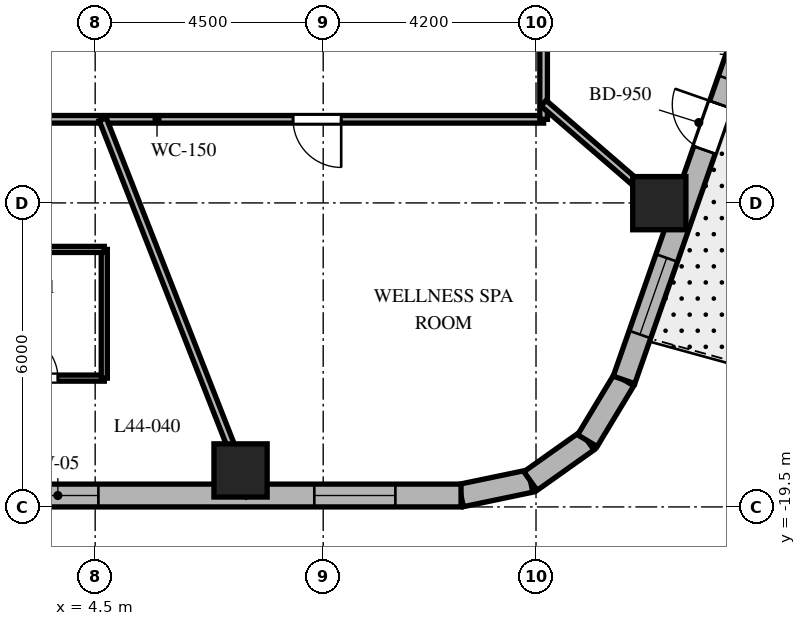
"""IFC4 building model, lengths in metres.
Left out: names, types, materials, properties, quantities, classifications, styles, units other than length and angle.
Written with IfcOpenShell. Run it as: python <this file> out.ifc"""

import sys

from ifc_helpers import new_model, si_unit, direction, frame, frame_2d, origin, origin_2d, place, context, subcontext, project, spatial, rectangle, extrude, element, fill, save


model = new_model("IFC4")
c1 = context("Model", 3, precision=1e-05, world=origin(), true_north=direction((0.0, 1.0)))
c2 = subcontext(c1, "Body", "Model", "MODEL_VIEW")
j1 = project(units=[si_unit("LENGTHUNIT", "METRE"), si_unit("PLANEANGLEUNIT", "RADIAN")], contexts=[c1])
p1 = place(None, origin())
s1 = spatial("IfcSite", under=j1, at=p1, CompositionType="ELEMENT")
p2 = place(p1, origin())
s2 = spatial("IfcBuilding", under=s1, at=p2, CompositionType="ELEMENT")
p3 = place(p2, frame((0.0, 0.0, 179.3)))
s3 = spatial("IfcBuildingStorey", under=s2, at=p3, CompositionType="ELEMENT", Elevation=179.3)
for number, where, z_axis, x_axis in (
    (1, (7.369, -18.78, 0.0), (0.0, 0.0, 1.0), (1.0, 0.0, 0.0)),
    (2, (15.633, -13.505, 0.0), (0.0, 0.0, 1.0), (1.0, 0.0, 0.0)),
):
    element("IfcColumn", number, at=place(p3, frame(where, z_axis=z_axis, x_axis=x_axis)), inside=s3, PredefinedType="COLUMN", context=c2, shape_type="SweptSolid", body=[
        extrude(rectangle(XDim=1.05, YDim=1.05, at=origin_2d()), origin(), (0.0, 0.0, 1.0), 3.7),
    ])
p4 = place(p3, frame((11.72, -19.275, 0.0), z_axis=(0.0, 0.0, 1.0), x_axis=(0.97893106758, 0.204191001093, 0.0)))
e3 = element("IfcWall", 3, at=p4, inside=s3, PredefinedType="SOLIDWALL", context=c2, shape_type="SweptSolid", body=[
    extrude(rectangle(XDim=1.4, YDim=0.45, at=frame_2d((0.7, 0.0))), origin(), (0.0, 0.0, 1.0), 3.4),
])
p5 = place(p3, frame((13.091, -18.989, 0.0), z_axis=(0.0, 0.0, 1.0), x_axis=(0.815574637848, 0.578651890258, 0.0)))
e4 = element("IfcWall", 4, at=p5, inside=s3, PredefinedType="SOLIDWALL", context=c2, shape_type="SweptSolid", body=[
    extrude(rectangle(XDim=1.377, YDim=0.45, at=frame_2d((0.688, 0.0))), origin(), (0.0, 0.0, 1.0), 3.4),
])
p6 = place(p3, frame((14.214, -18.192, 0.0), z_axis=(0.0, 0.0, 1.0), x_axis=(0.516340945502, 0.856383108193, 0.0)))
e5 = element("IfcWall", 5, at=p6, inside=s3, PredefinedType="SOLIDWALL", context=c2, shape_type="SweptSolid", body=[
    extrude(rectangle(XDim=1.4, YDim=0.45, at=frame_2d((0.7, 0.0))), origin(), (0.0, 0.0, 1.0), 3.4),
])
p7 = place(p3, frame((-10.108, -19.275, 0.0), z_axis=(0.0, 0.0, 1.0), x_axis=(1.0, 0.0, 0.0)))
e6 = element("IfcWall", 6, at=p7, inside=s3, PredefinedType="SOLIDWALL", context=c2, shape_type="SweptSolid", body=[
    extrude(rectangle(XDim=21.829, YDim=0.45, at=frame_2d((10.915, 0.0))), origin(), (0.0, 0.0, 1.0), 3.4),
])
p8 = place(p7, frame((1.297, 0.0, 0.8)))
e7 = element("IfcOpeningElement", 7, at=p8, cuts=e6, PredefinedType="OPENING", context=c2, shape_type="SweptSolid", body=[
    extrude(rectangle(XDim=1.6, YDim=1.75, at=frame_2d((0.8, 0.875))), frame((0.0, 0.235, 0.0), z_axis=(0.0, -1.0, 0.0), x_axis=(1.0, 0.0, 0.0)), (0.0, 0.0, 1.0), 0.47),
])
p9 = place(p7, frame((7.09, 0.0, 0.8)))
e8 = element("IfcOpeningElement", 8, at=p9, cuts=e6, PredefinedType="OPENING", context=c2, shape_type="SweptSolid", body=[
    extrude(rectangle(XDim=1.6, YDim=1.75, at=frame_2d((0.8, 0.875))), frame((0.0, 0.235, 0.0), z_axis=(0.0, -1.0, 0.0), x_axis=(1.0, 0.0, 0.0)), (0.0, 0.0, 1.0), 0.47),
])
p10 = place(p7, frame((13.072, 0.0, 0.8)))
e9 = element("IfcOpeningElement", 9, at=p10, cuts=e6, PredefinedType="OPENING", context=c2, shape_type="SweptSolid", body=[
    extrude(rectangle(XDim=1.6, YDim=1.75, at=frame_2d((0.8, 0.875))), frame((0.0, 0.235, 0.0), z_axis=(0.0, -1.0, 0.0), x_axis=(1.0, 0.0, 0.0)), (0.0, 0.0, 1.0), 0.47),
])
p11 = place(p7, frame((18.933, 0.0, 0.8)))
e10 = element("IfcOpeningElement", 10, at=p11, cuts=e6, PredefinedType="OPENING", context=c2, shape_type="SweptSolid", body=[
    extrude(rectangle(XDim=1.6, YDim=1.75, at=frame_2d((0.8, 0.875))), frame((0.0, 0.235, 0.0), z_axis=(0.0, -1.0, 0.0), x_axis=(1.0, 0.0, 0.0)), (0.0, 0.0, 1.0), 0.47),
])
p12 = place(p3, frame((14.937, -16.993, 0.0), z_axis=(0.0, 0.0, 1.0), x_axis=(0.330431575061, 0.943829949834, 0.0)))
e11 = element("IfcWall", 11, at=p12, inside=s3, PredefinedType="SOLIDWALL", context=c2, shape_type="SweptSolid", body=[
    extrude(rectangle(XDim=17.689, YDim=0.45, at=frame_2d((8.844, 0.0))), origin(), (0.0, 0.0, 1.0), 3.4),
])
p13 = place(p12, frame((4.807, 0.0, 0.0)))
e12 = element("IfcOpeningElement", 12, at=p13, cuts=e11, PredefinedType="OPENING", context=c2, shape_type="SweptSolid", body=[
    extrude(rectangle(XDim=0.95, YDim=2.15, at=frame_2d((0.475, 1.075))), frame((0.0, 0.235, 0.0), z_axis=(0.0, -1.0, 0.0), x_axis=(1.0, 0.0, 0.0)), (0.0, 0.0, 1.0), 0.47),
])
p14 = place(p12, frame((0.95, 0.0, 0.8)))
e13 = element("IfcOpeningElement", 13, at=p14, cuts=e11, PredefinedType="OPENING", context=c2, shape_type="SweptSolid", body=[
    extrude(rectangle(XDim=1.6, YDim=1.75, at=frame_2d((0.8, 0.875))), frame((0.0, 0.235, 0.0), z_axis=(0.0, -1.0, 0.0), x_axis=(1.0, 0.0, 0.0)), (0.0, 0.0, 1.0), 0.47),
])
p15 = place(p12, frame((6.286, 0.0, 0.8)))
e14 = element("IfcOpeningElement", 14, at=p15, cuts=e11, PredefinedType="OPENING", context=c2, shape_type="SweptSolid", body=[
    extrude(rectangle(XDim=1.0, YDim=1.65, at=frame_2d((0.5, 0.825))), frame((0.0, 0.235, 0.0), z_axis=(0.0, -1.0, 0.0), x_axis=(1.0, 0.0, 0.0)), (0.0, 0.0, 1.0), 0.47),
])
p16 = place(p12, frame((10.21, 0.0, 0.8)))
e15 = element("IfcOpeningElement", 15, at=p16, cuts=e11, PredefinedType="OPENING", context=c2, shape_type="SweptSolid", body=[
    extrude(rectangle(XDim=1.6, YDim=1.75, at=frame_2d((0.8, 0.875))), frame((0.0, 0.235, 0.0), z_axis=(0.0, -1.0, 0.0), x_axis=(1.0, 0.0, 0.0)), (0.0, 0.0, 1.0), 0.47),
])
p17 = place(p12, frame((15.084, 0.0, 0.8)))
e16 = element("IfcOpeningElement", 16, at=p17, cuts=e11, PredefinedType="OPENING", context=c2, shape_type="SweptSolid", body=[
    extrude(rectangle(XDim=1.6, YDim=1.75, at=frame_2d((0.8, 0.875))), frame((0.0, 0.235, 0.0), z_axis=(0.0, -1.0, 0.0), x_axis=(1.0, 0.0, 0.0)), (0.0, 0.0, 1.0), 0.47),
])
p18 = place(p3, frame((13.35, -11.85, 0.0), z_axis=(0.0, 0.0, 1.0), x_axis=(-1.0, 0.0, 0.0)))
e17 = element("IfcWall", 17, at=p18, inside=s3, PredefinedType="PARTITIONING", context=c2, shape_type="SweptSolid", body=[
    extrude(rectangle(XDim=26.7, YDim=0.15, at=frame_2d((13.35, 0.0))), origin(), (0.0, 0.0, 1.0), 2.84),
])
p19 = place(p18, frame((22.7, 0.0, 0.0)))
e18 = element("IfcOpeningElement", 18, at=p19, cuts=e17, PredefinedType="OPENING", context=c2, shape_type="SweptSolid", body=[
    extrude(rectangle(XDim=0.9, YDim=2.03, at=frame_2d((0.45, 1.015))), frame((0.0, 0.085, 0.0), z_axis=(0.0, -1.0, 0.0), x_axis=(1.0, 0.0, 0.0)), (0.0, 0.0, 1.0), 0.17),
])
p20 = place(p18, frame((18.523, 0.0, 0.0)))
e19 = element("IfcOpeningElement", 19, at=p20, cuts=e17, PredefinedType="OPENING", context=c2, shape_type="SweptSolid", body=[
    extrude(rectangle(XDim=0.95, YDim=2.03, at=frame_2d((0.475, 1.015))), frame((0.0, 0.085, 0.0), z_axis=(0.0, -1.0, 0.0), x_axis=(1.0, 0.0, 0.0)), (0.0, 0.0, 1.0), 0.17),
])
p21 = place(p18, frame((14.469, 0.0, 0.0)))
e20 = element("IfcOpeningElement", 20, at=p21, cuts=e17, PredefinedType="OPENING", context=c2, shape_type="SweptSolid", body=[
    extrude(rectangle(XDim=0.95, YDim=2.03, at=frame_2d((0.475, 1.015))), frame((0.0, 0.085, 0.0), z_axis=(0.0, -1.0, 0.0), x_axis=(1.0, 0.0, 0.0)), (0.0, 0.0, 1.0), 0.17),
])
p22 = place(p18, frame((10.314, 0.0, 0.0)))
e21 = element("IfcOpeningElement", 21, at=p22, cuts=e17, PredefinedType="OPENING", context=c2, shape_type="SweptSolid", body=[
    extrude(rectangle(XDim=0.95, YDim=2.03, at=frame_2d((0.475, 1.015))), frame((0.0, 0.085, 0.0), z_axis=(0.0, -1.0, 0.0), x_axis=(1.0, 0.0, 0.0)), (0.0, 0.0, 1.0), 0.17),
])
p23 = place(p18, frame((3.995, 0.0, 0.0)))
e22 = element("IfcOpeningElement", 22, at=p23, cuts=e17, PredefinedType="OPENING", context=c2, shape_type="SweptSolid", body=[
    extrude(rectangle(XDim=0.95, YDim=2.03, at=frame_2d((0.475, 1.015))), frame((0.0, 0.085, 0.0), z_axis=(0.0, -1.0, 0.0), x_axis=(1.0, 0.0, 0.0)), (0.0, 0.0, 1.0), 0.17),
])
p24 = place(p3, frame((13.35, 11.85, 0.0), z_axis=(0.0, 0.0, 1.0), x_axis=(0.0, -1.0, 0.0)))
e23 = element("IfcWall", 23, at=p24, inside=s3, PredefinedType="PARTITIONING", context=c2, shape_type="SweptSolid", body=[
    extrude(rectangle(XDim=23.7, YDim=0.15, at=frame_2d((11.85, 0.0))), origin(), (0.0, 0.0, 1.0), 2.84),
])
p25 = place(p24, frame((9.27, 0.0, 0.0)))
e24 = element("IfcOpeningElement", 24, at=p25, cuts=e23, PredefinedType="OPENING", context=c2, shape_type="SweptSolid", body=[
    extrude(rectangle(XDim=0.9, YDim=2.03, at=frame_2d((0.45, 1.015))), frame((0.0, 0.085, 0.0), z_axis=(0.0, -1.0, 0.0), x_axis=(1.0, 0.0, 0.0)), (0.0, 0.0, 1.0), 0.17),
])
p26 = place(p24, frame((3.765, 0.0, 0.0)))
e25 = element("IfcOpeningElement", 25, at=p26, cuts=e23, PredefinedType="OPENING", context=c2, shape_type="SweptSolid", body=[
    extrude(rectangle(XDim=0.9, YDim=2.03, at=frame_2d((0.45, 1.015))), frame((0.0, 0.085, 0.0), z_axis=(0.0, -1.0, 0.0), x_axis=(1.0, 0.0, 0.0)), (0.0, 0.0, 1.0), 0.17),
])
p27 = place(p24, frame((20.662, 0.0, 0.0)))
e26 = element("IfcOpeningElement", 26, at=p27, cuts=e23, PredefinedType="OPENING", context=c2, shape_type="SweptSolid", body=[
    extrude(rectangle(XDim=0.9, YDim=2.03, at=frame_2d((0.45, 1.015))), frame((0.0, 0.085, 0.0), z_axis=(0.0, -1.0, 0.0), x_axis=(1.0, 0.0, 0.0)), (0.0, 0.0, 1.0), 0.17),
])
p28 = place(p24, frame((16.055, 0.0, 0.0)))
e27 = element("IfcOpeningElement", 27, at=p28, cuts=e23, PredefinedType="OPENING", context=c2, shape_type="SweptSolid", body=[
    extrude(rectangle(XDim=0.95, YDim=2.03, at=frame_2d((0.475, 1.015))), frame((0.0, 0.085, 0.0), z_axis=(0.0, -1.0, 0.0), x_axis=(1.0, 0.0, 0.0)), (0.0, 0.0, 1.0), 0.17),
])
p29 = place(p24, frame((12.315, 0.0, 0.0)))
e28 = element("IfcOpeningElement", 28, at=p29, cuts=e23, PredefinedType="OPENING", context=c2, shape_type="SweptSolid", body=[
    extrude(rectangle(XDim=0.9, YDim=2.03, at=frame_2d((0.45, 1.015))), frame((0.0, 0.085, 0.0), z_axis=(0.0, -1.0, 0.0), x_axis=(1.0, 0.0, 0.0)), (0.0, 0.0, 1.0), 0.17),
])
p30 = place(p3, frame((4.65, -11.85, 0.0), z_axis=(0.0, 0.0, 1.0), x_axis=(0.365265947993, -0.930903210456, 0.0)))
e29 = element("IfcWall", 29, at=p30, inside=s3, PredefinedType="PARTITIONING", context=c2, shape_type="SweptSolid", body=[
    extrude(rectangle(XDim=7.976, YDim=0.15, at=frame_2d((3.988, 0.0))), origin(), (0.0, 0.0, 1.0), 2.64),
])
p31 = place(p3, frame((13.35, -11.533, 0.0), z_axis=(0.0, 0.0, 1.0), x_axis=(0.756711647314, -0.65374879183, 0.0)))
e30 = element("IfcWall", 30, at=p31, inside=s3, PredefinedType="PARTITIONING", context=c2, shape_type="SweptSolid", body=[
    extrude(rectangle(XDim=3.55, YDim=0.15, at=frame_2d((1.775, 0.0))), origin(), (0.0, 0.0, 1.0), 2.64),
])
p32 = place(p3, frame((2.0, -16.958, 0.0), z_axis=(0.0, 0.0, 1.0), x_axis=(1.0, 0.0, 0.0)))
e31 = element("IfcWall", 31, at=p32, inside=s3, PredefinedType="PARTITIONING", context=c2, shape_type="SweptSolid", body=[
    extrude(rectangle(XDim=2.68, YDim=0.12, at=frame_2d((1.34, 0.0))), origin(), (0.0, 0.0, 1.0), 3.4),
])
p33 = place(p32, frame((0.915, 0.0, 0.0)))
e32 = element("IfcOpeningElement", 32, at=p33, cuts=e31, PredefinedType="OPENING", context=c2, shape_type="SweptSolid", body=[
    extrude(rectangle(XDim=0.85, YDim=2.03, at=frame_2d((0.425, 1.015))), frame((0.0, 0.07, 0.0), z_axis=(0.0, -1.0, 0.0), x_axis=(1.0, 0.0, 0.0)), (0.0, 0.0, 1.0), 0.14),
])
p34 = place(p3, frame((4.68, -16.958, 0.0), z_axis=(0.0, 0.0, 1.0), x_axis=(0.0, 1.0, 0.0)))
e33 = element("IfcWall", 33, at=p34, inside=s3, PredefinedType="PARTITIONING", context=c2, shape_type="SweptSolid", body=[
    extrude(rectangle(XDim=2.54, YDim=0.12, at=frame_2d((1.27, 0.0))), origin(), (0.0, 0.0, 1.0), 2.84),
])
p35 = place(p3, frame((4.68, -14.418, 0.0), z_axis=(0.0, 0.0, 1.0), x_axis=(-1.0, 0.0, 0.0)))
e34 = element("IfcWall", 34, at=p35, inside=s3, PredefinedType="PARTITIONING", context=c2, shape_type="SweptSolid", body=[
    extrude(rectangle(XDim=2.68, YDim=0.12, at=frame_2d((1.34, 0.0))), origin(), (0.0, 0.0, 1.0), 3.4),
])
p36 = place(p10, origin())
e35 = element("IfcWindow", 35, at=p36, inside=s3, PartitioningType="SINGLE_PANEL", PredefinedType="WINDOW", context=c2, shape_type="SweptSolid", body=[
    extrude(rectangle(XDim=1.6, YDim=1.75, at=frame_2d((0.8, 0.875))), frame((0.0, 0.03, 0.0), z_axis=(0.0, -1.0, 0.0), x_axis=(1.0, 0.0, 0.0)), (0.0, 0.0, 1.0), 0.06),
])
fill(e9, e35)
p37 = place(p11, origin())
e36 = element("IfcWindow", 36, at=p37, inside=s3, PartitioningType="SINGLE_PANEL", PredefinedType="WINDOW", context=c2, shape_type="SweptSolid", body=[
    extrude(rectangle(XDim=1.6, YDim=1.75, at=frame_2d((0.8, 0.875))), frame((0.0, 0.03, 0.0), z_axis=(0.0, -1.0, 0.0), x_axis=(1.0, 0.0, 0.0)), (0.0, 0.0, 1.0), 0.06),
])
fill(e10, e36)
p38 = place(p13, origin())
e37 = element("IfcDoor", 37, at=p38, inside=s3, OperationType="SINGLE_SWING_RIGHT", PredefinedType="DOOR", context=c2, shape_type="SweptSolid", body=[
    extrude(rectangle(XDim=0.95, YDim=2.15, at=frame_2d((0.475, 1.075))), frame((0.0, 0.025, 0.0), z_axis=(0.0, -1.0, 0.0), x_axis=(1.0, 0.0, 0.0)), (0.0, 0.0, 1.0), 0.05),
])
fill(e12, e37)
p39 = place(p14, origin())
e38 = element("IfcWindow", 38, at=p39, inside=s3, PartitioningType="SINGLE_PANEL", PredefinedType="WINDOW", context=c2, shape_type="SweptSolid", body=[
    extrude(rectangle(XDim=1.6, YDim=1.75, at=frame_2d((0.8, 0.875))), frame((0.0, 0.03, 0.0), z_axis=(0.0, -1.0, 0.0), x_axis=(1.0, 0.0, 0.0)), (0.0, 0.0, 1.0), 0.06),
])
fill(e13, e38)
p40 = place(p33, origin())
e39 = element("IfcDoor", 39, at=p40, inside=s3, OperationType="SINGLE_SWING_LEFT", PredefinedType="DOOR", context=c2, shape_type="SweptSolid", body=[
    extrude(rectangle(XDim=0.85, YDim=2.03, at=frame_2d((0.425, 1.015))), frame((0.0, 0.025, 0.0), z_axis=(0.0, -1.0, 0.0), x_axis=(1.0, 0.0, 0.0)), (0.0, 0.0, 1.0), 0.05),
])
fill(e32, e39)
p41 = place(p23, origin())
e40 = element("IfcDoor", 40, at=p41, inside=s3, OperationType="SINGLE_SWING_LEFT", PredefinedType="DOOR", context=c2, shape_type="SweptSolid", body=[
    extrude(rectangle(XDim=0.95, YDim=2.03, at=frame_2d((0.475, 1.015))), frame((0.0, 0.025, 0.0), z_axis=(0.0, -1.0, 0.0), x_axis=(1.0, 0.0, 0.0)), (0.0, 0.0, 1.0), 0.05),
])
fill(e22, e40)
save(model, sys.argv[1])
